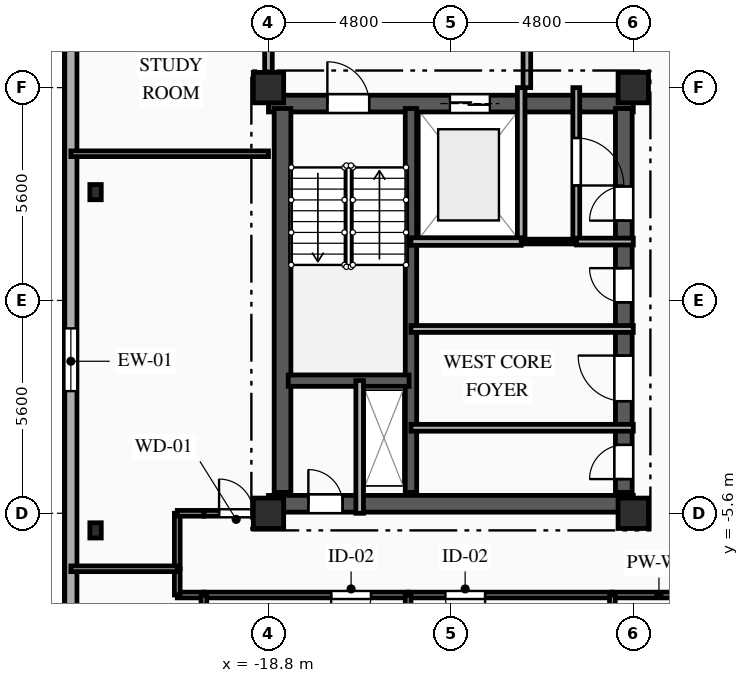
"""IFC4 building model, lengths in metres.
Left out: names, types, materials, properties, quantities, classifications, styles, units other than length and angle.
Written with IfcOpenShell. Run it as: python <this file> out.ifc"""

import sys

from ifc_helpers import new_model, si_unit, direction, frame, frame_2d, origin, origin_2d, place, context, subcontext, project, spatial, rectangle, i_section, extrude, element, fill, save


model = new_model("IFC4")
c1 = context("Model", 3, precision=1e-05, world=origin(), true_north=direction((0.0, 1.0)))
c2 = subcontext(c1, "Body", "Model", "MODEL_VIEW")
j1 = project(units=[si_unit("LENGTHUNIT", "METRE"), si_unit("PLANEANGLEUNIT", "RADIAN")], contexts=[c1])
p1 = place(None, origin())
s1 = spatial("IfcSite", under=j1, at=p1, CompositionType="ELEMENT")
p2 = place(p1, origin())
s2 = spatial("IfcBuilding", under=s1, at=p2, CompositionType="ELEMENT")
p3 = place(p2, frame((0.0, 0.0, 258.45)))
s3 = spatial("IfcBuildingStorey", under=s2, at=p3, CompositionType="ELEMENT", Elevation=258.45)
for number, where, z_axis, x_axis in (
    (1, (-18.8, -5.6, 0.0), (0.0, 0.0, 1.0), (1.0, 0.0, 0.0)),
    (2, (-18.8, 5.6, 0.0), (0.0, 0.0, 1.0), (1.0, 0.0, 0.0)),
    (3, (-9.2, -5.6, 0.0), (0.0, 0.0, 1.0), (1.0, 0.0, 0.0)),
    (4, (-9.2, 5.6, 0.0), (0.0, 0.0, 1.0), (1.0, 0.0, 0.0)),
):
    element("IfcColumn", number, at=place(p3, frame(where, z_axis=z_axis, x_axis=x_axis)), inside=s3, PredefinedType="COLUMN", context=c2, shape_type="SweptSolid", body=[
        extrude(rectangle(XDim=0.8, YDim=0.8, at=origin_2d()), origin(), (0.0, 0.0, 1.0), 3.35),
    ])
for number, where, z_axis, x_axis in (
    (5, (-23.35, 2.85, 0.0), (0.0, 0.0, 1.0), (1.0, 0.0, 0.0)),
    (6, (-23.35, -6.05, 0.0), (0.0, 0.0, 1.0), (1.0, 0.0, 0.0)),
):
    element("IfcColumn", number, at=place(p3, frame(where, z_axis=z_axis, x_axis=x_axis)), inside=s3, PredefinedType="COLUMN", context=c2, shape_type="SweptSolid", body=[
        extrude(i_section(OverallWidth=0.3, OverallDepth=0.4, WebThickness=0.013, FlangeThickness=0.024, FilletRadius=0.027, at=origin_2d()), origin(), (0.0, 0.0, 1.0), 3.35),
    ])
p4 = place(p3, frame((-24.0, -15.6, 0.0), z_axis=(0.0, 0.0, 1.0), x_axis=(0.0, 1.0, 0.0)))
e7 = element("IfcWall", 7, at=p4, inside=s3, PredefinedType="SOLIDWALL", context=c2, shape_type="SweptSolid", body=[
    extrude(rectangle(XDim=28.0, YDim=0.32, at=frame_2d((14.0, 0.0))), origin(), (0.0, 0.0, 1.0), 3.03),
])
p5 = place(p4, frame((3.695, 0.0, 0.85)))
e8 = element("IfcOpeningElement", 8, at=p5, cuts=e7, PredefinedType="OPENING", context=c2, shape_type="SweptSolid", body=[
    extrude(rectangle(XDim=1.65, YDim=1.85, at=frame_2d((0.825, 0.925))), frame((0.0, 0.17, 0.0), z_axis=(0.0, -1.0, 0.0), x_axis=(1.0, 0.0, 0.0)), (0.0, 0.0, 1.0), 0.34),
])
p6 = place(p4, frame((13.215, 0.0, 0.85)))
e9 = element("IfcOpeningElement", 9, at=p6, cuts=e7, PredefinedType="OPENING", context=c2, shape_type="SweptSolid", body=[
    extrude(rectangle(XDim=1.65, YDim=1.85, at=frame_2d((0.825, 0.925))), frame((0.0, 0.17, 0.0), z_axis=(0.0, -1.0, 0.0), x_axis=(1.0, 0.0, 0.0)), (0.0, 0.0, 1.0), 0.34),
])
p7 = place(p4, frame((22.735, 0.0, 0.85)))
e10 = element("IfcOpeningElement", 10, at=p7, cuts=e7, PredefinedType="OPENING", context=c2, shape_type="SweptSolid", body=[
    extrude(rectangle(XDim=1.65, YDim=1.85, at=frame_2d((0.825, 0.925))), frame((0.0, 0.17, 0.0), z_axis=(0.0, -1.0, 0.0), x_axis=(1.0, 0.0, 0.0)), (0.0, 0.0, 1.0), 0.34),
])
p8 = place(p3, frame((-18.8, 5.18, 0.0), z_axis=(0.0, 0.0, 1.0), x_axis=(1.0, 0.0, 0.0)))
e11 = element("IfcWall", 11, at=p8, inside=s3, PredefinedType="SHEAR", context=c2, shape_type="SweptSolid", body=[
    extrude(rectangle(XDim=9.6, YDim=0.44, at=frame_2d((4.8, 0.0))), origin(), (0.0, 0.0, 1.0), 3.03),
])
p9 = place(p8, frame((1.55, 0.0, 0.0)))
e12 = element("IfcOpeningElement", 12, at=p9, cuts=e11, PredefinedType="OPENING", context=c2, shape_type="SweptSolid", body=[
    extrude(rectangle(XDim=1.1, YDim=2.15, at=frame_2d((0.55, 1.075))), frame((0.0, 0.23, 0.0), z_axis=(0.0, -1.0, 0.0), x_axis=(1.0, 0.0, 0.0)), (0.0, 0.0, 1.0), 0.46),
])
p10 = place(p8, frame((4.775, 0.0, 0.0)))
e13 = element("IfcOpeningElement", 13, at=p10, cuts=e11, PredefinedType="OPENING", context=c2, shape_type="SweptSolid", body=[
    extrude(rectangle(XDim=1.05, YDim=2.1, at=frame_2d((0.525, 1.05))), frame((0.0, 0.23, 0.0), z_axis=(0.0, -1.0, 0.0), x_axis=(1.0, 0.0, 0.0)), (0.0, 0.0, 1.0), 0.46),
])
p11 = place(p3, frame((-18.8, -5.35, 0.0), z_axis=(0.0, 0.0, 1.0), x_axis=(1.0, 0.0, 0.0)))
e14 = element("IfcWall", 14, at=p11, inside=s3, PredefinedType="SHEAR", context=c2, shape_type="SweptSolid", body=[
    extrude(rectangle(XDim=9.6, YDim=0.44, at=frame_2d((4.8, 0.0))), origin(), (0.0, 0.0, 1.0), 3.03),
])
p12 = place(p11, frame((1.05, 0.0, 0.0)))
e15 = element("IfcOpeningElement", 15, at=p12, cuts=e14, PredefinedType="OPENING", context=c2, shape_type="SweptSolid", body=[
    extrude(rectangle(XDim=0.9, YDim=2.1, at=frame_2d((0.45, 1.05))), frame((0.0, 0.23, 0.0), z_axis=(0.0, -1.0, 0.0), x_axis=(1.0, 0.0, 0.0)), (0.0, 0.0, 1.0), 0.46),
])
p13 = place(p3, frame((-18.43, -5.05, 0.0), z_axis=(0.0, 0.0, 1.0), x_axis=(0.0, 1.0, 0.0)))
e16 = element("IfcWall", 16, at=p13, inside=s3, PredefinedType="SHEAR", context=c2, shape_type="SweptSolid", body=[
    extrude(rectangle(XDim=10.1, YDim=0.44, at=frame_2d((5.05, 0.0))), origin(), (0.0, 0.0, 1.0), 3.03),
])
p14 = place(p3, frame((-9.45, -5.05, 0.0), z_axis=(0.0, 0.0, 1.0), x_axis=(0.0, 1.0, 0.0)))
e17 = element("IfcWall", 17, at=p14, inside=s3, PredefinedType="SHEAR", context=c2, shape_type="SweptSolid", body=[
    extrude(rectangle(XDim=10.1, YDim=0.44, at=frame_2d((5.05, 0.0))), origin(), (0.0, 0.0, 1.0), 3.03),
])
p15 = place(p14, frame((7.15, 0.0, 0.0)))
e18 = element("IfcOpeningElement", 18, at=p15, cuts=e17, PredefinedType="OPENING", context=c2, shape_type="SweptSolid", body=[
    extrude(rectangle(XDim=0.9, YDim=2.1, at=frame_2d((0.45, 1.05))), frame((0.0, 0.23, 0.0), z_axis=(0.0, -1.0, 0.0), x_axis=(1.0, 0.0, 0.0)), (0.0, 0.0, 1.0), 0.46),
])
p16 = place(p14, frame((2.4, 0.0, 0.0)))
e19 = element("IfcOpeningElement", 19, at=p16, cuts=e17, PredefinedType="OPENING", context=c2, shape_type="SweptSolid", body=[
    extrude(rectangle(XDim=1.2, YDim=2.15, at=frame_2d((0.6, 1.075))), frame((0.0, 0.23, 0.0), z_axis=(0.0, -1.0, 0.0), x_axis=(1.0, 0.0, 0.0)), (0.0, 0.0, 1.0), 0.46),
])
p17 = place(p14, frame((0.35, 0.0, 0.0)))
e20 = element("IfcOpeningElement", 20, at=p17, cuts=e17, PredefinedType="OPENING", context=c2, shape_type="SweptSolid", body=[
    extrude(rectangle(XDim=0.9, YDim=2.1, at=frame_2d((0.45, 1.05))), frame((0.0, 0.23, 0.0), z_axis=(0.0, -1.0, 0.0), x_axis=(1.0, 0.0, 0.0)), (0.0, 0.0, 1.0), 0.46),
])
p18 = place(p14, frame((5.0, 0.0, 0.0)))
e21 = element("IfcOpeningElement", 21, at=p18, cuts=e17, PredefinedType="OPENING", context=c2, shape_type="SweptSolid", body=[
    extrude(rectangle(XDim=0.9, YDim=2.1, at=frame_2d((0.45, 1.05))), frame((0.0, 0.23, 0.0), z_axis=(0.0, -1.0, 0.0), x_axis=(1.0, 0.0, 0.0)), (0.0, 0.0, 1.0), 0.46),
])
p19 = place(p3, frame((-15.05, -5.05, 0.0), z_axis=(0.0, 0.0, 1.0), x_axis=(0.0, 1.0, 0.0)))
e22 = element("IfcWall", 22, at=p19, inside=s3, PredefinedType="SHEAR", context=c2, shape_type="SweptSolid", body=[
    extrude(rectangle(XDim=10.1, YDim=0.3, at=frame_2d((5.05, 0.0))), origin(), (0.0, 0.0, 1.0), 3.03),
])
p20 = place(p3, frame((-18.28, -2.11, 0.0), z_axis=(0.0, 0.0, 1.0), x_axis=(1.0, 0.0, 0.0)))
e23 = element("IfcWall", 23, at=p20, inside=s3, PredefinedType="SHEAR", context=c2, shape_type="SweptSolid", body=[
    extrude(rectangle(XDim=3.18, YDim=0.3, at=frame_2d((1.59, 0.0))), origin(), (0.0, 0.0, 1.0), 3.03),
])
p21 = place(p3, frame((-16.4, -5.6, 0.0), z_axis=(0.0, 0.0, 1.0), x_axis=(0.0, 1.0, 0.0)))
e24 = element("IfcWall", 24, at=p21, inside=s3, PredefinedType="PARTITIONING", context=c2, shape_type="SweptSolid", body=[
    extrude(rectangle(XDim=3.49, YDim=0.2, at=frame_2d((1.745, 0.0))), origin(), (0.0, 0.0, 1.0), 3.03),
])
p22 = place(p3, frame((-12.15, 1.55, 0.0), z_axis=(0.0, 0.0, 1.0), x_axis=(0.0, 1.0, 0.0)))
e25 = element("IfcWall", 25, at=p22, inside=s3, PredefinedType="PARTITIONING", context=c2, shape_type="SweptSolid", body=[
    extrude(rectangle(XDim=4.05, YDim=0.2, at=frame_2d((2.025, 0.0))), origin(), (0.0, 0.0, 1.0), 3.03),
])
p23 = place(p3, frame((-12.0, 5.6, 0.0), z_axis=(0.0, 0.0, 1.0), x_axis=(0.0, 1.0, 0.0)))
e26 = element("IfcWall", 26, at=p23, inside=s3, PredefinedType="PARTITIONING", context=c2, shape_type="SweptSolid", body=[
    extrude(rectangle(XDim=2.9, YDim=0.2, at=frame_2d((1.45, 0.0))), origin(), (0.0, 0.0, 1.0), 3.03),
])
p24 = place(p3, frame((-18.8, 8.5, 0.0), z_axis=(0.0, 0.0, 1.0), x_axis=(0.0, -1.0, 0.0)))
e27 = element("IfcWall", 27, at=p24, inside=s3, PredefinedType="PARTITIONING", context=c2, shape_type="SweptSolid", body=[
    extrude(rectangle(XDim=2.9, YDim=0.2, at=frame_2d((1.45, 0.0))), origin(), (0.0, 0.0, 1.0), 2.655),
])
p25 = place(p3, frame((-10.7, 5.6, 0.0), z_axis=(0.0, 0.0, 1.0), x_axis=(0.0, -1.0, 0.0)))
e28 = element("IfcWall", 28, at=p25, inside=s3, PredefinedType="PARTITIONING", context=c2, shape_type="SweptSolid", body=[
    extrude(rectangle(XDim=4.05, YDim=0.18, at=frame_2d((2.025, 0.0))), origin(), (0.0, 0.0, 1.0), 3.03),
])
p26 = place(p25, frame((1.325, 0.0, 0.0)))
e29 = element("IfcOpeningElement", 29, at=p26, cuts=e28, PredefinedType="OPENING", context=c2, shape_type="SweptSolid", body=[
    extrude(rectangle(XDim=1.25, YDim=2.2, at=frame_2d((0.625, 1.1))), frame((0.0, 0.1, 0.0), z_axis=(0.0, -1.0, 0.0), x_axis=(1.0, 0.0, 0.0)), (0.0, 0.0, 1.0), 0.2),
])
p27 = place(p3, frame((-10.7, 1.55, 0.0), z_axis=(0.0, 0.0, 1.0), x_axis=(1.0, 0.0, 0.0)))
e30 = element("IfcWall", 30, at=p27, inside=s3, PredefinedType="PARTITIONING", context=c2, shape_type="SweptSolid", body=[
    extrude(rectangle(XDim=1.5, YDim=0.18, at=frame_2d((0.75, 0.0))), origin(), (0.0, 0.0, 1.0), 3.03),
])
p28 = place(p3, frame((-12.15, 1.55, 0.0), z_axis=(0.0, 0.0, 1.0), x_axis=(1.0, 0.0, 0.0)))
e31 = element("IfcWall", 31, at=p28, inside=s3, PredefinedType="PARTITIONING", context=c2, shape_type="SweptSolid", body=[
    extrude(rectangle(XDim=1.45, YDim=0.125, at=frame_2d((0.725, 0.0))), origin(), (0.0, 0.0, 1.0), 3.03),
])
p29 = place(p3, frame((-15.05, -3.35, 0.0), z_axis=(0.0, 0.0, 1.0), x_axis=(1.0, 0.0, 0.0)))
e32 = element("IfcWall", 32, at=p29, inside=s3, PredefinedType="PARTITIONING", context=c2, shape_type="SweptSolid", body=[
    extrude(rectangle(XDim=5.85, YDim=0.18, at=frame_2d((2.925, 0.0))), origin(), (0.0, 0.0, 1.0), 2.745),
])
p30 = place(p3, frame((-9.2, -0.75, 0.0), z_axis=(0.0, 0.0, 1.0), x_axis=(-1.0, 0.0, 0.0)))
e33 = element("IfcWall", 33, at=p30, inside=s3, PredefinedType="PARTITIONING", context=c2, shape_type="SweptSolid", body=[
    extrude(rectangle(XDim=5.85, YDim=0.18, at=frame_2d((2.925, 0.0))), origin(), (0.0, 0.0, 1.0), 3.03),
])
p31 = place(p3, frame((-20.5, -7.75, 0.0), z_axis=(0.0, 0.0, 1.0), x_axis=(-1.0, 0.0, 0.0)))
e34 = element("IfcWall", 34, at=p31, inside=s3, PredefinedType="PARTITIONING", context=c2, shape_type="SweptSolid", body=[
    extrude(rectangle(XDim=0.7, YDim=0.15, at=frame_2d((0.35, 0.0))), origin(), (0.0, 0.0, 1.0), 3.03),
])
p32 = place(p3, frame((-21.2, -7.75, 0.0), z_axis=(0.0, 0.0, 1.0), x_axis=(0.0, 1.0, 0.0)))
e35 = element("IfcWall", 35, at=p32, inside=s3, PredefinedType="PARTITIONING", context=c2, shape_type="SweptSolid", body=[
    extrude(rectangle(XDim=0.69, YDim=0.15, at=frame_2d((0.345, 0.0))), origin(), (0.0, 0.0, 1.0), 2.685),
])
p33 = place(p3, frame((-20.5, -5.6, 0.0), z_axis=(0.0, 0.0, 1.0), x_axis=(1.0, 0.0, 0.0)))
e36 = element("IfcWall", 36, at=p33, inside=s3, PredefinedType="PARTITIONING", context=c2, shape_type="SweptSolid", body=[
    extrude(rectangle(XDim=1.7, YDim=0.15, at=frame_2d((0.85, 0.0))), origin(), (0.0, 0.0, 1.0), 3.03),
])
p34 = place(p33, frame((0.4, 0.0, 0.0)))
e37 = element("IfcOpeningElement", 37, at=p34, cuts=e36, PredefinedType="OPENING", context=c2, shape_type="SweptSolid", body=[
    extrude(rectangle(XDim=0.9, YDim=2.1, at=frame_2d((0.45, 1.05))), frame((0.0, 0.085, 0.0), z_axis=(0.0, -1.0, 0.0), x_axis=(1.0, 0.0, 0.0)), (0.0, 0.0, 1.0), 0.17),
])
p35 = place(p3, frame((-21.2, -7.06, 0.0), z_axis=(0.0, 0.0, 1.0), x_axis=(0.0, 1.0, 0.0)))
e38 = element("IfcWall", 38, at=p35, inside=s3, PredefinedType="PARTITIONING", context=c2, shape_type="SweptSolid", body=[
    extrude(rectangle(XDim=1.46, YDim=0.15, at=frame_2d((0.73, 0.0))), origin(), (0.0, 0.0, 1.0), 2.685),
])
p36 = place(p3, frame((-21.2, -5.6, 0.0), z_axis=(0.0, 0.0, 1.0), x_axis=(1.0, 0.0, 0.0)))
e39 = element("IfcWall", 39, at=p36, inside=s3, PredefinedType="PARTITIONING", context=c2, shape_type="SweptSolid", body=[
    extrude(rectangle(XDim=0.7, YDim=0.15, at=frame_2d((0.35, 0.0))), origin(), (0.0, 0.0, 1.0), 3.03),
])
p37 = place(p3, frame((-15.125, -7.75, 0.0), z_axis=(0.0, 0.0, 1.0), x_axis=(-1.0, 0.0, 0.0)))
e40 = element("IfcWall", 40, at=p37, inside=s3, PredefinedType="PARTITIONING", context=c2, shape_type="SweptSolid", body=[
    extrude(rectangle(XDim=5.375, YDim=0.15, at=frame_2d((2.688, 0.0))), origin(), (0.0, 0.0, 1.0), 3.03),
])
p38 = place(p37, frame((0.976, 0.0, 0.0)))
e41 = element("IfcOpeningElement", 41, at=p38, cuts=e40, PredefinedType="OPENING", context=c2, shape_type="SweptSolid", body=[
    extrude(rectangle(XDim=1.05, YDim=2.15, at=frame_2d((0.525, 1.075))), frame((0.0, 0.085, 0.0), z_axis=(0.0, -1.0, 0.0), x_axis=(1.0, 0.0, 0.0)), (0.0, 0.0, 1.0), 0.17),
])
p39 = place(p3, frame((-9.75, -7.75, 0.0), z_axis=(0.0, 0.0, 1.0), x_axis=(-1.0, 0.0, 0.0)))
e42 = element("IfcWall", 42, at=p39, inside=s3, PredefinedType="PARTITIONING", context=c2, shape_type="SweptSolid", body=[
    extrude(rectangle(XDim=5.375, YDim=0.15, at=frame_2d((2.688, 0.0))), origin(), (0.0, 0.0, 1.0), 3.03),
])
p40 = place(p39, frame((3.349, 0.0, 0.0)))
e43 = element("IfcOpeningElement", 43, at=p40, cuts=e42, PredefinedType="OPENING", context=c2, shape_type="SweptSolid", body=[
    extrude(rectangle(XDim=1.05, YDim=2.15, at=frame_2d((0.525, 1.075))), frame((0.0, 0.085, 0.0), z_axis=(0.0, -1.0, 0.0), x_axis=(1.0, 0.0, 0.0)), (0.0, 0.0, 1.0), 0.17),
])
p41 = place(p3, frame((-7.3, -7.75, 0.0), z_axis=(0.0, 0.0, 1.0), x_axis=(-1.0, 0.0, 0.0)))
e44 = element("IfcWall", 44, at=p41, inside=s3, PredefinedType="PLUMBINGWALL", context=c2, shape_type="SweptSolid", body=[
    extrude(rectangle(XDim=2.45, YDim=0.15, at=frame_2d((1.225, 0.0))), origin(), (0.0, 0.0, 1.0), 3.03),
])
p42 = place(p3, frame((-24.0, -7.06, 0.0), z_axis=(0.0, 0.0, 1.0), x_axis=(1.0, 0.0, 0.0)))
e45 = element("IfcWall", 45, at=p42, inside=s3, PredefinedType="PARTITIONING", context=c2, shape_type="SweptSolid", body=[
    extrude(rectangle(XDim=2.8, YDim=0.15, at=frame_2d((1.4, 0.0))), origin(), (0.0, 0.0, 1.0), 3.03),
])
p43 = place(p3, frame((-20.5, -7.75, 0.0), z_axis=(0.0, 0.0, 1.0), x_axis=(0.0, -1.0, 0.0)))
e46 = element("IfcWall", 46, at=p43, inside=s3, PredefinedType="PARTITIONING", context=c2, shape_type="SweptSolid", body=[
    extrude(rectangle(XDim=10.65, YDim=0.15, at=frame_2d((5.325, 0.0))), origin(), (0.0, 0.0, 1.0), 2.655),
])
p44 = place(p43, frame((2.69, 0.0, 0.0)))
e47 = element("IfcOpeningElement", 47, at=p44, cuts=e46, PredefinedType="OPENING", context=c2, shape_type="SweptSolid", body=[
    extrude(rectangle(XDim=1.05, YDim=2.15, at=frame_2d((0.525, 1.075))), frame((0.0, 0.085, 0.0), z_axis=(0.0, -1.0, 0.0), x_axis=(1.0, 0.0, 0.0)), (0.0, 0.0, 1.0), 0.17),
])
p45 = place(p3, frame((-24.0, 3.86, 0.0), z_axis=(0.0, 0.0, 1.0), x_axis=(1.0, 0.0, 0.0)))
e48 = element("IfcWall", 48, at=p45, inside=s3, PredefinedType="PARTITIONING", context=c2, shape_type="SweptSolid", body=[
    extrude(rectangle(XDim=5.2, YDim=0.15, at=frame_2d((2.6, 0.0))), origin(), (0.0, 0.0, 1.0), 3.03),
])
p46 = place(p3, frame((-15.125, -7.75, 0.0), z_axis=(0.0, 0.0, 1.0), x_axis=(0.0, -1.0, 0.0)))
e49 = element("IfcWall", 49, at=p46, inside=s3, PredefinedType="PARTITIONING", context=c2, shape_type="SweptSolid", body=[
    extrude(rectangle(XDim=10.65, YDim=0.15, at=frame_2d((5.325, 0.0))), origin(), (0.0, 0.0, 1.0), 3.03),
])
p47 = place(p3, frame((-9.75, -7.75, 0.0), z_axis=(0.0, 0.0, 1.0), x_axis=(0.0, -1.0, 0.0)))
e50 = element("IfcWall", 50, at=p47, inside=s3, PredefinedType="PLUMBINGWALL", context=c2, shape_type="SweptSolid", body=[
    extrude(rectangle(XDim=2.15, YDim=0.15, at=frame_2d((1.075, 0.0))), origin(), (0.0, 0.0, 1.0), 3.03),
])
p48 = place(p3, frame((-15.05, 1.55, 0.0), z_axis=(0.0, 0.0, 1.0), x_axis=(1.0, 0.0, 0.0)))
e51 = element("IfcWall", 51, at=p48, inside=s3, PredefinedType="PARTITIONING", context=c2, shape_type="SweptSolid", body=[
    extrude(rectangle(XDim=2.9, YDim=0.2, at=frame_2d((1.45, 0.0))), origin(), (0.0, 0.0, 1.0), 3.03),
])
p49 = place(p6, origin())
e52 = element("IfcWindow", 52, at=p49, inside=s3, PartitioningType="SINGLE_PANEL", PredefinedType="WINDOW", context=c2, shape_type="SweptSolid", body=[
    extrude(rectangle(XDim=1.65, YDim=1.85, at=frame_2d((0.825, 0.925))), frame((0.0, 0.03, 0.0), z_axis=(0.0, -1.0, 0.0), x_axis=(1.0, 0.0, 0.0)), (0.0, 0.0, 1.0), 0.06),
])
fill(e9, e52)
p50 = place(p9, origin())
e53 = element("IfcDoor", 53, at=p50, inside=s3, OperationType="SINGLE_SWING_LEFT", PredefinedType="DOOR", context=c2, shape_type="SweptSolid", body=[
    extrude(rectangle(XDim=1.1, YDim=2.15, at=frame_2d((0.55, 1.075))), frame((0.0, 0.025, 0.0), z_axis=(0.0, -1.0, 0.0), x_axis=(1.0, 0.0, 0.0)), (0.0, 0.0, 1.0), 0.05),
])
fill(e12, e53)
p51 = place(p10, origin())
e54 = element("IfcDoor", 54, at=p51, inside=s3, OperationType="DOUBLE_DOOR_SLIDING", PredefinedType="DOOR", context=c2, shape_type="SweptSolid", body=[
    extrude(rectangle(XDim=1.05, YDim=2.1, at=frame_2d((0.525, 1.05))), frame((0.0, 0.025, 0.0), z_axis=(0.0, -1.0, 0.0), x_axis=(1.0, 0.0, 0.0)), (0.0, 0.0, 1.0), 0.05),
])
fill(e13, e54)
p52 = place(p12, origin())
e55 = element("IfcDoor", 55, at=p52, inside=s3, OperationType="SINGLE_SWING_LEFT", PredefinedType="DOOR", context=c2, shape_type="SweptSolid", body=[
    extrude(rectangle(XDim=0.9, YDim=2.1, at=frame_2d((0.45, 1.05))), frame((0.0, 0.025, 0.0), z_axis=(0.0, -1.0, 0.0), x_axis=(1.0, 0.0, 0.0)), (0.0, 0.0, 1.0), 0.05),
])
fill(e15, e55)
p53 = place(p26, origin())
e56 = element("IfcDoor", 56, at=p53, inside=s3, OperationType="SINGLE_SWING_RIGHT", PredefinedType="DOOR", context=c2, shape_type="SweptSolid", body=[
    extrude(rectangle(XDim=1.25, YDim=2.2, at=frame_2d((0.625, 1.1))), frame((0.0, 0.025, 0.0), z_axis=(0.0, -1.0, 0.0), x_axis=(1.0, 0.0, 0.0)), (0.0, 0.0, 1.0), 0.05),
])
fill(e29, e56)
p54 = place(p15, origin())
e57 = element("IfcDoor", 57, at=p54, inside=s3, OperationType="SINGLE_SWING_LEFT", PredefinedType="DOOR", context=c2, shape_type="SweptSolid", body=[
    extrude(rectangle(XDim=0.9, YDim=2.1, at=frame_2d((0.45, 1.05))), frame((0.0, 0.025, 0.0), z_axis=(0.0, -1.0, 0.0), x_axis=(1.0, 0.0, 0.0)), (0.0, 0.0, 1.0), 0.05),
])
fill(e18, e57)
p55 = place(p16, origin())
e58 = element("IfcDoor", 58, at=p55, inside=s3, OperationType="SINGLE_SWING_RIGHT", PredefinedType="DOOR", context=c2, shape_type="SweptSolid", body=[
    extrude(rectangle(XDim=1.2, YDim=2.15, at=frame_2d((0.6, 1.075))), frame((0.0, 0.025, 0.0), z_axis=(0.0, -1.0, 0.0), x_axis=(1.0, 0.0, 0.0)), (0.0, 0.0, 1.0), 0.05),
])
fill(e19, e58)
p56 = place(p17, origin())
e59 = element("IfcDoor", 59, at=p56, inside=s3, OperationType="SINGLE_SWING_LEFT", PredefinedType="DOOR", context=c2, shape_type="SweptSolid", body=[
    extrude(rectangle(XDim=0.9, YDim=2.1, at=frame_2d((0.45, 1.05))), frame((0.0, 0.025, 0.0), z_axis=(0.0, -1.0, 0.0), x_axis=(1.0, 0.0, 0.0)), (0.0, 0.0, 1.0), 0.05),
])
fill(e20, e59)
p57 = place(p18, origin())
e60 = element("IfcDoor", 60, at=p57, inside=s3, OperationType="SINGLE_SWING_RIGHT", PredefinedType="DOOR", context=c2, shape_type="SweptSolid", body=[
    extrude(rectangle(XDim=0.9, YDim=2.1, at=frame_2d((0.45, 1.05))), frame((0.0, 0.025, 0.0), z_axis=(0.0, -1.0, 0.0), x_axis=(1.0, 0.0, 0.0)), (0.0, 0.0, 1.0), 0.05),
])
fill(e21, e60)
p58 = place(p34, origin())
e61 = element("IfcDoor", 61, at=p58, inside=s3, OperationType="SINGLE_SWING_LEFT", PredefinedType="DOOR", context=c2, shape_type="SweptSolid", body=[
    extrude(rectangle(XDim=0.9, YDim=2.1, at=frame_2d((0.45, 1.05))), frame((0.0, 0.025, 0.0), z_axis=(0.0, -1.0, 0.0), x_axis=(1.0, 0.0, 0.0)), (0.0, 0.0, 1.0), 0.05),
])
fill(e37, e61)
p59 = place(p38, origin())
e62 = element("IfcDoor", 62, at=p59, inside=s3, OperationType="SINGLE_SWING_RIGHT", PredefinedType="DOOR", context=c2, shape_type="SweptSolid", body=[
    extrude(rectangle(XDim=1.05, YDim=2.15, at=frame_2d((0.525, 1.075))), frame((0.0, 0.025, 0.0), z_axis=(0.0, -1.0, 0.0), x_axis=(1.0, 0.0, 0.0)), (0.0, 0.0, 1.0), 0.05),
])
fill(e41, e62)
p60 = place(p40, origin())
e63 = element("IfcDoor", 63, at=p60, inside=s3, OperationType="SINGLE_SWING_LEFT", PredefinedType="DOOR", context=c2, shape_type="SweptSolid", body=[
    extrude(rectangle(XDim=1.05, YDim=2.15, at=frame_2d((0.525, 1.075))), frame((0.0, 0.025, 0.0), z_axis=(0.0, -1.0, 0.0), x_axis=(1.0, 0.0, 0.0)), (0.0, 0.0, 1.0), 0.05),
])
fill(e43, e63)
save(model, sys.argv[1])
